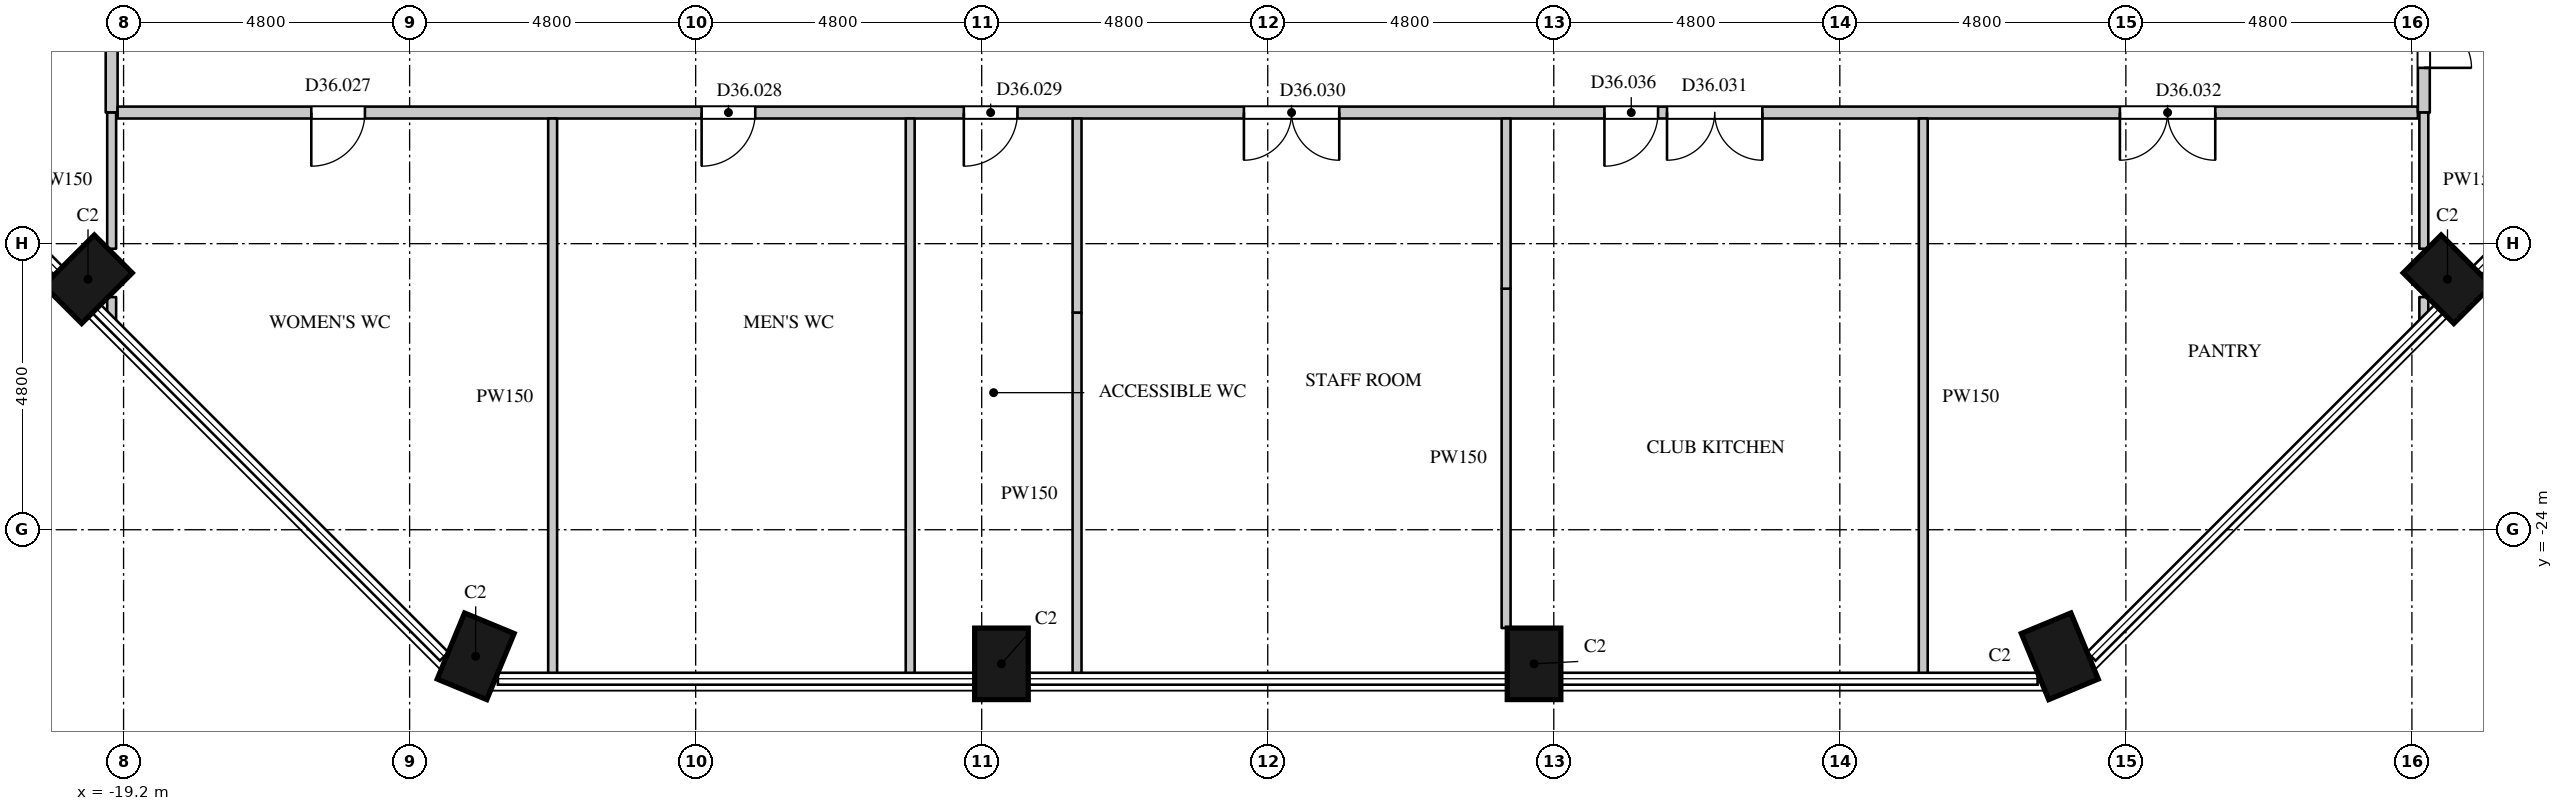
"""IFC4 building model, lengths in metres.
Left out: names, types, materials, properties, quantities, classifications, styles, units other than length and angle.
Written with IfcOpenShell. Run it as: python <this file> out.ifc"""

import sys

from ifc_helpers import new_model, si_unit, direction, frame, frame_2d, origin, origin_2d, place, context, subcontext, project, spatial, rectangle, extrude, element, fill, save


model = new_model("IFC4")
c1 = context("Model", 3, precision=1e-05, world=origin(), true_north=direction((0.0, 1.0)))
c2 = subcontext(c1, "Body", "Model", "MODEL_VIEW")
j1 = project(units=[si_unit("LENGTHUNIT", "METRE"), si_unit("PLANEANGLEUNIT", "RADIAN")], contexts=[c1])
p1 = place(None, origin())
s1 = spatial("IfcSite", under=j1, at=p1, CompositionType="ELEMENT")
p2 = place(p1, origin())
s2 = spatial("IfcBuilding", under=s1, at=p2, CompositionType="ELEMENT")
p3 = place(p2, frame((0.0, 0.0, 156.9)))
s3 = spatial("IfcBuildingStorey", under=s2, at=p3, CompositionType="ELEMENT", Elevation=156.9)
for number, where, z_axis, x_axis in (
    (1, (-19.797, -19.797, 0.0), (0.0, 0.0, 1.0), (0.707, -0.707, 0.0)),
    (2, (-13.291, -26.124, 0.0), (0.0, 0.0, 1.0), (0.924, -0.383, 0.0)),
    (3, (-4.469, -26.25, 0.0), (0.0, 0.0, 1.0), (1.0, 0.0, 0.0)),
    (4, (4.469, -26.25, 0.0), (0.0, 0.0, 1.0), (1.0, 0.0, 0.0)),
    (5, (13.291, -26.124, 0.0), (0.0, 0.0, 1.0), (0.924, 0.383, 0.0)),
    (6, (19.797, -19.797, 0.0), (0.0, 0.0, 1.0), (0.707, 0.707, 0.0)),
):
    element("IfcColumn", number, at=place(p3, frame(where, z_axis=z_axis, x_axis=x_axis)), inside=s3, PredefinedType="COLUMN", context=c2, shape_type="SweptSolid", body=[
        extrude(rectangle(XDim=0.9, YDim=1.2, at=origin_2d()), origin(), (0.0, 0.0, 1.0), 5.4),
    ])
p4 = place(p3, frame((-19.4, -17.0, 0.0), z_axis=(0.0, 0.0, 1.0), x_axis=(0.0, 1.0, 0.0)))
e7 = element("IfcWall", 7, at=p4, inside=s3, PredefinedType="PARTITIONING", context=c2, shape_type="SweptSolid", body=[
    extrude(rectangle(XDim=34.0, YDim=0.2, at=frame_2d((17.0, 0.0))), origin(), (0.0, 0.0, 1.0), 5.1),
])
p5 = place(p4, frame((1.75, 0.0, 0.0)))
e8 = element("IfcOpeningElement", 8, at=p5, cuts=e7, PredefinedType="OPENING", context=c2, shape_type="SweptSolid", body=[
    extrude(rectangle(XDim=1.6, YDim=2.4, at=frame_2d((0.8, 1.2))), frame((0.0, 0.11, 0.0), z_axis=(0.0, -1.0, 0.0), x_axis=(1.0, 0.0, 0.0)), (0.0, 0.0, 1.0), 0.22),
])
p6 = place(p4, frame((8.2, 0.0, 0.0)))
e9 = element("IfcOpeningElement", 9, at=p6, cuts=e7, PredefinedType="OPENING", context=c2, shape_type="SweptSolid", body=[
    extrude(rectangle(XDim=1.6, YDim=2.4, at=frame_2d((0.8, 1.2))), frame((0.0, 0.11, 0.0), z_axis=(0.0, -1.0, 0.0), x_axis=(1.0, 0.0, 0.0)), (0.0, 0.0, 1.0), 0.22),
])
p7 = place(p4, frame((16.2, 0.0, 0.0)))
e10 = element("IfcOpeningElement", 10, at=p7, cuts=e7, PredefinedType="OPENING", context=c2, shape_type="SweptSolid", body=[
    extrude(rectangle(XDim=1.6, YDim=2.4, at=frame_2d((0.8, 1.2))), frame((0.0, 0.11, 0.0), z_axis=(0.0, -1.0, 0.0), x_axis=(1.0, 0.0, 0.0)), (0.0, 0.0, 1.0), 0.22),
])
p8 = place(p4, frame((24.2, 0.0, 0.0)))
e11 = element("IfcOpeningElement", 11, at=p8, cuts=e7, PredefinedType="OPENING", context=c2, shape_type="SweptSolid", body=[
    extrude(rectangle(XDim=1.6, YDim=2.4, at=frame_2d((0.8, 1.2))), frame((0.0, 0.11, 0.0), z_axis=(0.0, -1.0, 0.0), x_axis=(1.0, 0.0, 0.0)), (0.0, 0.0, 1.0), 0.22),
])
p9 = place(p4, frame((30.65, 0.0, 0.0)))
e12 = element("IfcOpeningElement", 12, at=p9, cuts=e7, PredefinedType="OPENING", context=c2, shape_type="SweptSolid", body=[
    extrude(rectangle(XDim=1.6, YDim=2.4, at=frame_2d((0.8, 1.2))), frame((0.0, 0.11, 0.0), z_axis=(0.0, -1.0, 0.0), x_axis=(1.0, 0.0, 0.0)), (0.0, 0.0, 1.0), 0.22),
])
p10 = place(p3, frame((-19.3, -17.0, 0.0), z_axis=(0.0, 0.0, 1.0), x_axis=(1.0, 0.0, 0.0)))
e13 = element("IfcWall", 13, at=p10, inside=s3, PredefinedType="PARTITIONING", context=c2, shape_type="SweptSolid", body=[
    extrude(rectangle(XDim=38.6, YDim=0.2, at=frame_2d((19.3, 0.0))), origin(), (0.0, 0.0, 1.0), 5.1),
])
p11 = place(p10, frame((3.25, 0.0, 0.0)))
e14 = element("IfcOpeningElement", 14, at=p11, cuts=e13, PredefinedType="OPENING", context=c2, shape_type="SweptSolid", body=[
    extrude(rectangle(XDim=0.9, YDim=2.2, at=frame_2d((0.45, 1.1))), frame((0.0, 0.11, 0.0), z_axis=(0.0, -1.0, 0.0), x_axis=(1.0, 0.0, 0.0)), (0.0, 0.0, 1.0), 0.22),
])
p12 = place(p10, frame((9.8, 0.0, 0.0)))
e15 = element("IfcOpeningElement", 15, at=p12, cuts=e13, PredefinedType="OPENING", context=c2, shape_type="SweptSolid", body=[
    extrude(rectangle(XDim=0.9, YDim=2.2, at=frame_2d((0.45, 1.1))), frame((0.0, 0.11, 0.0), z_axis=(0.0, -1.0, 0.0), x_axis=(1.0, 0.0, 0.0)), (0.0, 0.0, 1.0), 0.22),
])
p13 = place(p10, frame((14.2, 0.0, 0.0)))
e16 = element("IfcOpeningElement", 16, at=p13, cuts=e13, PredefinedType="OPENING", context=c2, shape_type="SweptSolid", body=[
    extrude(rectangle(XDim=0.9, YDim=2.2, at=frame_2d((0.45, 1.1))), frame((0.0, 0.11, 0.0), z_axis=(0.0, -1.0, 0.0), x_axis=(1.0, 0.0, 0.0)), (0.0, 0.0, 1.0), 0.22),
])
p14 = place(p10, frame((18.9, 0.0, 0.0)))
e17 = element("IfcOpeningElement", 17, at=p14, cuts=e13, PredefinedType="OPENING", context=c2, shape_type="SweptSolid", body=[
    extrude(rectangle(XDim=1.6, YDim=2.4, at=frame_2d((0.8, 1.2))), frame((0.0, 0.11, 0.0), z_axis=(0.0, -1.0, 0.0), x_axis=(1.0, 0.0, 0.0)), (0.0, 0.0, 1.0), 0.22),
])
p15 = place(p10, frame((26.0, 0.0, 0.0)))
e18 = element("IfcOpeningElement", 18, at=p15, cuts=e13, PredefinedType="OPENING", context=c2, shape_type="SweptSolid", body=[
    extrude(rectangle(XDim=1.6, YDim=2.4, at=frame_2d((0.8, 1.2))), frame((0.0, 0.11, 0.0), z_axis=(0.0, -1.0, 0.0), x_axis=(1.0, 0.0, 0.0)), (0.0, 0.0, 1.0), 0.22),
])
p16 = place(p10, frame((33.6, 0.0, 0.0)))
e19 = element("IfcOpeningElement", 19, at=p16, cuts=e13, PredefinedType="OPENING", context=c2, shape_type="SweptSolid", body=[
    extrude(rectangle(XDim=1.6, YDim=2.4, at=frame_2d((0.8, 1.2))), frame((0.0, 0.11, 0.0), z_axis=(0.0, -1.0, 0.0), x_axis=(1.0, 0.0, 0.0)), (0.0, 0.0, 1.0), 0.22),
])
p17 = place(p10, frame((24.95, 0.0, 0.0)))
e20 = element("IfcOpeningElement", 20, at=p17, cuts=e13, PredefinedType="OPENING", context=c2, shape_type="SweptSolid", body=[
    extrude(rectangle(XDim=0.9, YDim=2.2, at=frame_2d((0.45, 1.1))), frame((0.0, 0.11, 0.0), z_axis=(0.0, -1.0, 0.0), x_axis=(1.0, 0.0, 0.0)), (0.0, 0.0, 1.0), 0.22),
])
p18 = place(p3, frame((19.4, -17.0, 0.0), z_axis=(0.0, 0.0, 1.0), x_axis=(0.0, 1.0, 0.0)))
e21 = element("IfcWall", 21, at=p18, inside=s3, PredefinedType="PARTITIONING", context=c2, shape_type="SweptSolid", body=[
    extrude(rectangle(XDim=34.0, YDim=0.2, at=frame_2d((17.0, 0.0))), origin(), (0.0, 0.0, 1.0), 5.1),
])
p19 = place(p18, frame((0.75, 0.0, 0.0)))
e22 = element("IfcOpeningElement", 22, at=p19, cuts=e21, PredefinedType="OPENING", context=c2, shape_type="SweptSolid", body=[
    extrude(rectangle(XDim=1.6, YDim=2.4, at=frame_2d((0.8, 1.2))), frame((0.0, 0.11, 0.0), z_axis=(0.0, -1.0, 0.0), x_axis=(1.0, 0.0, 0.0)), (0.0, 0.0, 1.0), 0.22),
])
p20 = place(p18, frame((5.2, 0.0, 0.0)))
e23 = element("IfcOpeningElement", 23, at=p20, cuts=e21, PredefinedType="OPENING", context=c2, shape_type="SweptSolid", body=[
    extrude(rectangle(XDim=1.6, YDim=2.4, at=frame_2d((0.8, 1.2))), frame((0.0, 0.11, 0.0), z_axis=(0.0, -1.0, 0.0), x_axis=(1.0, 0.0, 0.0)), (0.0, 0.0, 1.0), 0.22),
])
p21 = place(p18, frame((12.2, 0.0, 0.0)))
e24 = element("IfcOpeningElement", 24, at=p21, cuts=e21, PredefinedType="OPENING", context=c2, shape_type="SweptSolid", body=[
    extrude(rectangle(XDim=1.6, YDim=2.4, at=frame_2d((0.8, 1.2))), frame((0.0, 0.11, 0.0), z_axis=(0.0, -1.0, 0.0), x_axis=(1.0, 0.0, 0.0)), (0.0, 0.0, 1.0), 0.22),
])
p22 = place(p18, frame((23.2, 0.0, 0.0)))
e25 = element("IfcOpeningElement", 25, at=p22, cuts=e21, PredefinedType="OPENING", context=c2, shape_type="SweptSolid", body=[
    extrude(rectangle(XDim=1.6, YDim=2.4, at=frame_2d((0.8, 1.2))), frame((0.0, 0.11, 0.0), z_axis=(0.0, -1.0, 0.0), x_axis=(1.0, 0.0, 0.0)), (0.0, 0.0, 1.0), 0.22),
])
p23 = place(p18, frame((31.65, 0.0, 0.0)))
e26 = element("IfcOpeningElement", 26, at=p23, cuts=e21, PredefinedType="OPENING", context=c2, shape_type="SweptSolid", body=[
    extrude(rectangle(XDim=1.6, YDim=2.4, at=frame_2d((0.8, 1.2))), frame((0.0, 0.11, 0.0), z_axis=(0.0, -1.0, 0.0), x_axis=(1.0, 0.0, 0.0)), (0.0, 0.0, 1.0), 0.22),
])
p24 = place(p18, frame((4.15, 0.0, 0.0)))
e27 = element("IfcOpeningElement", 27, at=p24, cuts=e21, PredefinedType="OPENING", context=c2, shape_type="SweptSolid", body=[
    extrude(rectangle(XDim=0.9, YDim=2.2, at=frame_2d((0.45, 1.1))), frame((0.0, 0.11, 0.0), z_axis=(0.0, -1.0, 0.0), x_axis=(1.0, 0.0, 0.0)), (0.0, 0.0, 1.0), 0.22),
])
p25 = place(p3, frame((-19.4, -20.484, 0.0), z_axis=(0.0, 0.0, 1.0), x_axis=(0.0, 1.0, 0.0)))
e28 = element("IfcWall", 28, at=p25, inside=s3, PredefinedType="PARTITIONING", context=c2, shape_type="SweptSolid", body=[
    extrude(rectangle(XDim=0.387, YDim=0.15, at=frame_2d((0.194, 0.0))), origin(), (0.0, 0.0, 1.0), 5.1),
])
p26 = place(p3, frame((-19.4, -19.285, 0.0), z_axis=(0.0, 0.0, 1.0), x_axis=(0.0, 1.0, 0.0)))
e29 = element("IfcWall", 29, at=p26, inside=s3, PredefinedType="PARTITIONING", context=c2, shape_type="SweptSolid", body=[
    extrude(rectangle(XDim=2.285, YDim=0.15, at=frame_2d((1.143, 0.0))), origin(), (0.0, 0.0, 1.0), 5.1),
])
for number, where, z_axis, x_axis in (
    (30, (-12.0, -26.455, 0.0), (0.0, 0.0, 1.0), (0.0, 1.0, 0.0)),
    (31, (-6.0, -26.455, 0.0), (0.0, 0.0, 1.0), (0.0, 1.0, 0.0)),
):
    element("IfcWall", number, at=place(p3, frame(where, z_axis=z_axis, x_axis=x_axis)), inside=s3, PredefinedType="PARTITIONING", context=c2, shape_type="SweptSolid", body=[
        extrude(rectangle(XDim=9.355, YDim=0.15, at=frame_2d((4.677, 0.0))), origin(), (0.0, 0.0, 1.0), 5.1),
    ])
p27 = place(p3, frame((-3.2, -26.455, 0.0), z_axis=(0.0, 0.0, 1.0), x_axis=(0.0, 1.0, 0.0)))
e32 = element("IfcWall", 32, at=p27, inside=s3, PredefinedType="PARTITIONING", context=c2, shape_type="SweptSolid", body=[
    extrude(rectangle(XDim=6.099, YDim=0.15, at=frame_2d((3.05, 0.0))), origin(), (0.0, 0.0, 1.0), 5.1),
])
p28 = place(p3, frame((-3.2, -20.356, 0.0), z_axis=(0.0, 0.0, 1.0), x_axis=(0.0, 1.0, 0.0)))
e33 = element("IfcWall", 33, at=p28, inside=s3, PredefinedType="PARTITIONING", context=c2, shape_type="SweptSolid", body=[
    extrude(rectangle(XDim=3.256, YDim=0.15, at=frame_2d((1.628, 0.0))), origin(), (0.0, 0.0, 1.0), 3.35),
])
p29 = place(p3, frame((4.0, -25.65, 0.0), z_axis=(0.0, 0.0, 1.0), x_axis=(0.0, 1.0, 0.0)))
e34 = element("IfcWall", 34, at=p29, inside=s3, PredefinedType="PARTITIONING", context=c2, shape_type="SweptSolid", body=[
    extrude(rectangle(XDim=5.695, YDim=0.15, at=frame_2d((2.847, 0.0))), origin(), (0.0, 0.0, 1.0), 3.35),
])
p30 = place(p3, frame((4.0, -19.955, 0.0), z_axis=(0.0, 0.0, 1.0), x_axis=(0.0, 1.0, 0.0)))
e35 = element("IfcWall", 35, at=p30, inside=s3, PredefinedType="PARTITIONING", context=c2, shape_type="SweptSolid", body=[
    extrude(rectangle(XDim=2.855, YDim=0.15, at=frame_2d((1.428, 0.0))), origin(), (0.0, 0.0, 1.0), 5.1),
])
p31 = place(p3, frame((11.0, -26.455, 0.0), z_axis=(0.0, 0.0, 1.0), x_axis=(0.0, 1.0, 0.0)))
e36 = element("IfcWall", 36, at=p31, inside=s3, PredefinedType="PARTITIONING", context=c2, shape_type="SweptSolid", body=[
    extrude(rectangle(XDim=9.355, YDim=0.15, at=frame_2d((4.677, 0.0))), origin(), (0.0, 0.0, 1.0), 5.1),
])
p32 = place(p3, frame((19.4, -20.484, 0.0), z_axis=(0.0, 0.0, 1.0), x_axis=(0.0, 1.0, 0.0)))
e37 = element("IfcWall", 37, at=p32, inside=s3, PredefinedType="PARTITIONING", context=c2, shape_type="SweptSolid", body=[
    extrude(rectangle(XDim=0.387, YDim=0.15, at=frame_2d((0.194, 0.0))), origin(), (0.0, 0.0, 1.0), 5.1),
])
p33 = place(p3, frame((19.4, -19.285, 0.0), z_axis=(0.0, 0.0, 1.0), x_axis=(0.0, 1.0, 0.0)))
e38 = element("IfcWall", 38, at=p33, inside=s3, PredefinedType="PARTITIONING", context=c2, shape_type="SweptSolid", body=[
    extrude(rectangle(XDim=2.285, YDim=0.15, at=frame_2d((1.143, 0.0))), origin(), (0.0, 0.0, 1.0), 5.1),
])
p34 = place(p19, origin())
e39 = element("IfcDoor", 39, at=p34, inside=s3, OperationType="DOUBLE_DOOR_SINGLE_SWING", PredefinedType="DOOR", context=c2, shape_type="SweptSolid", body=[
    extrude(rectangle(XDim=1.6, YDim=2.4, at=frame_2d((0.8, 1.2))), frame((0.0, 0.025, 0.0), z_axis=(0.0, -1.0, 0.0), x_axis=(1.0, 0.0, 0.0)), (0.0, 0.0, 1.0), 0.05),
])
fill(e22, e39)
p35 = place(p11, origin())
e40 = element("IfcDoor", 40, at=p35, inside=s3, OperationType="SINGLE_SWING_RIGHT", PredefinedType="DOOR", context=c2, shape_type="SweptSolid", body=[
    extrude(rectangle(XDim=0.9, YDim=2.2, at=frame_2d((0.45, 1.1))), frame((0.0, 0.025, 0.0), z_axis=(0.0, -1.0, 0.0), x_axis=(1.0, 0.0, 0.0)), (0.0, 0.0, 1.0), 0.05),
])
fill(e14, e40)
p36 = place(p12, origin())
e41 = element("IfcDoor", 41, at=p36, inside=s3, OperationType="SINGLE_SWING_RIGHT", PredefinedType="DOOR", context=c2, shape_type="SweptSolid", body=[
    extrude(rectangle(XDim=0.9, YDim=2.2, at=frame_2d((0.45, 1.1))), frame((0.0, 0.025, 0.0), z_axis=(0.0, -1.0, 0.0), x_axis=(1.0, 0.0, 0.0)), (0.0, 0.0, 1.0), 0.05),
])
fill(e15, e41)
p37 = place(p13, origin())
e42 = element("IfcDoor", 42, at=p37, inside=s3, OperationType="SINGLE_SWING_RIGHT", PredefinedType="DOOR", context=c2, shape_type="SweptSolid", body=[
    extrude(rectangle(XDim=0.9, YDim=2.2, at=frame_2d((0.45, 1.1))), frame((0.0, 0.025, 0.0), z_axis=(0.0, -1.0, 0.0), x_axis=(1.0, 0.0, 0.0)), (0.0, 0.0, 1.0), 0.05),
])
fill(e16, e42)
p38 = place(p14, origin())
e43 = element("IfcDoor", 43, at=p38, inside=s3, OperationType="DOUBLE_DOOR_SINGLE_SWING", PredefinedType="DOOR", context=c2, shape_type="SweptSolid", body=[
    extrude(rectangle(XDim=1.6, YDim=2.4, at=frame_2d((0.8, 1.2))), frame((0.0, 0.025, 0.0), z_axis=(0.0, -1.0, 0.0), x_axis=(1.0, 0.0, 0.0)), (0.0, 0.0, 1.0), 0.05),
])
fill(e17, e43)
p39 = place(p15, origin())
e44 = element("IfcDoor", 44, at=p39, inside=s3, OperationType="DOUBLE_DOOR_SINGLE_SWING", PredefinedType="DOOR", context=c2, shape_type="SweptSolid", body=[
    extrude(rectangle(XDim=1.6, YDim=2.4, at=frame_2d((0.8, 1.2))), frame((0.0, 0.025, 0.0), z_axis=(0.0, -1.0, 0.0), x_axis=(1.0, 0.0, 0.0)), (0.0, 0.0, 1.0), 0.05),
])
fill(e18, e44)
p40 = place(p16, origin())
e45 = element("IfcDoor", 45, at=p40, inside=s3, OperationType="DOUBLE_DOOR_SINGLE_SWING", PredefinedType="DOOR", context=c2, shape_type="SweptSolid", body=[
    extrude(rectangle(XDim=1.6, YDim=2.4, at=frame_2d((0.8, 1.2))), frame((0.0, 0.025, 0.0), z_axis=(0.0, -1.0, 0.0), x_axis=(1.0, 0.0, 0.0)), (0.0, 0.0, 1.0), 0.05),
])
fill(e19, e45)
p41 = place(p17, origin())
e46 = element("IfcDoor", 46, at=p41, inside=s3, OperationType="SINGLE_SWING_RIGHT", PredefinedType="DOOR", context=c2, shape_type="SweptSolid", body=[
    extrude(rectangle(XDim=0.9, YDim=2.2, at=frame_2d((0.45, 1.1))), frame((0.0, 0.025, 0.0), z_axis=(0.0, -1.0, 0.0), x_axis=(1.0, 0.0, 0.0)), (0.0, 0.0, 1.0), 0.05),
])
fill(e20, e46)
save(model, sys.argv[1])
